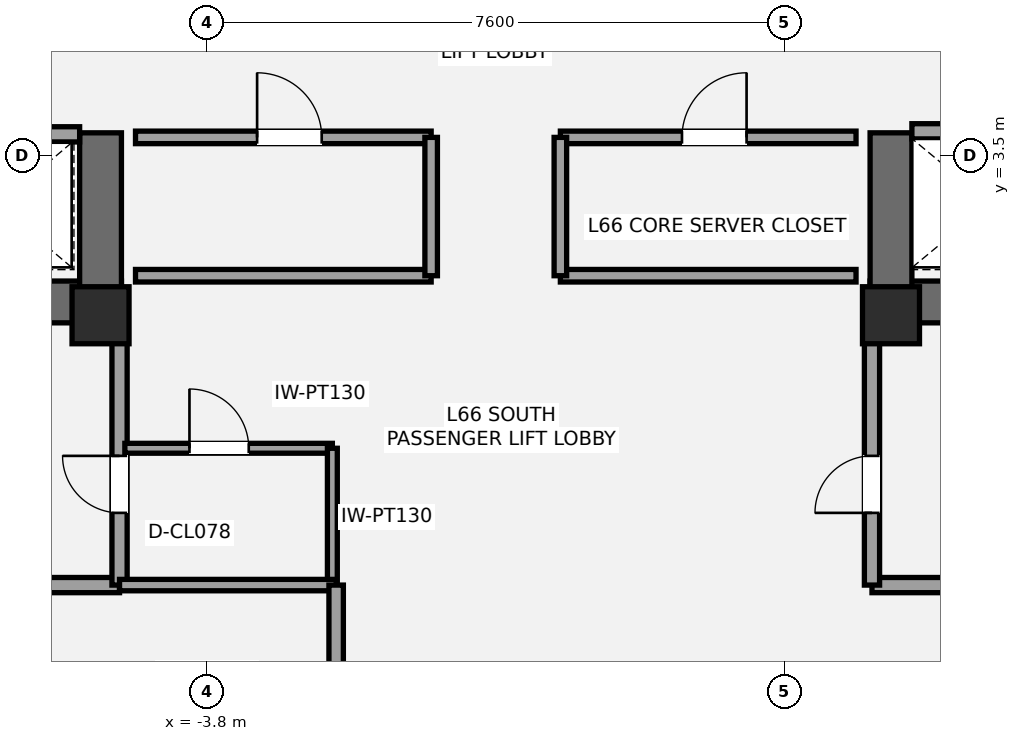
"""IFC4 building model, lengths in metres.
Left out: names, types, materials, properties, quantities, classifications, styles, units other than length and angle.
Written with IfcOpenShell. Run it as: python <this file> out.ifc"""

import sys

from ifc_helpers import new_model, si_unit, direction, frame, frame_2d, origin, origin_2d, place, context, subcontext, project, spatial, rectangle, extrude, element, fill, save


model = new_model("IFC4")
c1 = context("Model", 3, precision=1e-05, world=origin(), true_north=direction((0.0, 1.0)))
c2 = subcontext(c1, "Body", "Model", "MODEL_VIEW")
j1 = project(units=[si_unit("LENGTHUNIT", "METRE"), si_unit("PLANEANGLEUNIT", "RADIAN")], contexts=[c1])
p1 = place(None, origin())
s1 = spatial("IfcSite", under=j1, at=p1, CompositionType="ELEMENT")
p2 = place(p1, origin())
s2 = spatial("IfcBuilding", under=s1, at=p2, CompositionType="ELEMENT")
p3 = place(p2, frame((0.0, 0.0, 235.2)))
s3 = spatial("IfcBuildingStorey", under=s2, at=p3, CompositionType="ELEMENT", Elevation=235.2)
p4 = place(p3, frame((-4.925, 1.575, 0.0), z_axis=(0.0, 0.0, 1.0), x_axis=(-1.0, 0.0, 0.0)))
e1 = element("IfcWall", 1, at=p4, inside=s3, PredefinedType="SHEAR", context=c2, shape_type="SweptSolid", body=[
    extrude(rectangle(XDim=8.775, YDim=0.55, at=frame_2d((4.387, 0.0))), origin(), (0.0, 0.0, 1.0), 3.15),
])
p5 = place(p4, frame((5.375, 0.0, 0.0)))
e2 = element("IfcOpeningElement", 2, at=p5, cuts=e1, PredefinedType="OPENING", context=c2, shape_type="SweptSolid", body=[
    extrude(rectangle(XDim=1.05, YDim=2.15, at=frame_2d((0.525, 1.075))), frame((0.0, 0.285, 0.0), z_axis=(0.0, -1.0, 0.0), x_axis=(1.0, 0.0, 0.0)), (0.0, 0.0, 1.0), 0.57),
])
p6 = place(p4, frame((3.705, 0.0, 0.0)))
e3 = element("IfcOpeningElement", 3, at=p6, cuts=e1, PredefinedType="OPENING", context=c2, shape_type="SweptSolid", body=[
    extrude(rectangle(XDim=1.1, YDim=2.2, at=frame_2d((0.55, 1.1))), frame((0.0, 0.285, 0.0), z_axis=(0.0, -1.0, 0.0), x_axis=(1.0, 0.0, 0.0)), (0.0, 0.0, 1.0), 0.57),
])
p7 = place(p3, frame((-5.2, 1.3, 0.0), z_axis=(0.0, 0.0, 1.0), x_axis=(0.0, 1.0, 0.0)))
e4 = element("IfcWall", 4, at=p7, inside=s3, PredefinedType="SHEAR", context=c2, shape_type="SweptSolid", body=[
    extrude(rectangle(XDim=2.5, YDim=0.55, at=frame_2d((1.25, 0.0))), origin(), (0.0, 0.0, 1.0), 3.15),
])
p8 = place(p3, frame((13.7, 1.575, 0.0), z_axis=(0.0, 0.0, 1.0), x_axis=(-1.0, 0.0, 0.0)))
e5 = element("IfcWall", 5, at=p8, inside=s3, PredefinedType="SHEAR", context=c2, shape_type="SweptSolid", body=[
    extrude(rectangle(XDim=8.775, YDim=0.55, at=frame_2d((4.387, 0.0))), origin(), (0.0, 0.0, 1.0), 3.15),
])
p9 = place(p8, frame((2.35, 0.0, 0.0)))
e6 = element("IfcOpeningElement", 6, at=p9, cuts=e5, PredefinedType="OPENING", context=c2, shape_type="SweptSolid", body=[
    extrude(rectangle(XDim=1.05, YDim=2.15, at=frame_2d((0.525, 1.075))), frame((0.0, 0.285, 0.0), z_axis=(0.0, -1.0, 0.0), x_axis=(1.0, 0.0, 0.0)), (0.0, 0.0, 1.0), 0.57),
])
p10 = place(p8, frame((4.35, 0.0, 0.0)))
e7 = element("IfcOpeningElement", 7, at=p10, cuts=e5, PredefinedType="OPENING", context=c2, shape_type="SweptSolid", body=[
    extrude(rectangle(XDim=1.1, YDim=2.2, at=frame_2d((0.55, 1.1))), frame((0.0, 0.285, 0.0), z_axis=(0.0, -1.0, 0.0), x_axis=(1.0, 0.0, 0.0)), (0.0, 0.0, 1.0), 0.57),
])
p11 = place(p3, frame((5.2, 1.3, 0.0), z_axis=(0.0, 0.0, 1.0), x_axis=(0.0, 1.0, 0.0)))
e8 = element("IfcWall", 8, at=p11, inside=s3, PredefinedType="SHEAR", context=c2, shape_type="SweptSolid", body=[
    extrude(rectangle(XDim=2.5, YDim=0.55, at=frame_2d((1.25, 0.0))), origin(), (0.0, 0.0, 1.0), 3.15),
])
for number, where, z_axis, x_axis in (
    (9, (-5.2, 1.4, 0.0), (0.0, 0.0, 1.0), (1.0, 0.0, 0.0)),
    (10, (5.2, 1.4, 0.0), (0.0, 0.0, 1.0), (1.0, 0.0, 0.0)),
):
    element("IfcColumn", number, at=place(p3, frame(where, z_axis=z_axis, x_axis=x_axis)), inside=s3, PredefinedType="PILASTER", context=c2, shape_type="SweptSolid", body=[
        extrude(rectangle(XDim=0.75, YDim=0.75, at=origin_2d()), origin(), (0.0, 0.0, 1.0), 3.15),
    ])
p12 = place(p3, frame((-7.2, -2.15, 0.0), z_axis=(0.0, 0.0, 1.0), x_axis=(1.0, 0.0, 0.0)))
e11 = element("IfcWall", 11, at=p12, inside=s3, PredefinedType="SOLIDWALL", context=c2, shape_type="SweptSolid", body=[
    extrude(rectangle(XDim=2.25, YDim=0.2, at=frame_2d((1.125, 0.0))), origin(), (0.0, 0.0, 1.0), 2.97),
])
p13 = place(p3, frame((-4.95, -2.15, 0.0), z_axis=(0.0, 0.0, 1.0), x_axis=(0.0, 1.0, 0.0)))
e12 = element("IfcWall", 12, at=p13, inside=s3, PredefinedType="SOLIDWALL", context=c2, shape_type="SweptSolid", body=[
    extrude(rectangle(XDim=3.5, YDim=0.2, at=frame_2d((1.75, 0.0))), origin(), (0.0, 0.0, 1.0), 2.423),
])
p14 = place(p13, frame((0.95, 0.0, 0.0)))
e13 = element("IfcOpeningElement", 13, at=p14, cuts=e12, PredefinedType="OPENING", context=c2, shape_type="SweptSolid", body=[
    extrude(rectangle(XDim=0.75, YDim=2.1, at=frame_2d((0.375, 1.05))), frame((0.0, 0.11, 0.0), z_axis=(0.0, -1.0, 0.0), x_axis=(1.0, 0.0, 0.0)), (0.0, 0.0, 1.0), 0.22),
])
p15 = place(p3, frame((4.95, -2.15, 0.0), z_axis=(0.0, 0.0, 1.0), x_axis=(1.0, 0.0, 0.0)))
e14 = element("IfcWall", 14, at=p15, inside=s3, PredefinedType="SOLIDWALL", context=c2, shape_type="SweptSolid", body=[
    extrude(rectangle(XDim=2.25, YDim=0.2, at=frame_2d((1.125, 0.0))), origin(), (0.0, 0.0, 1.0), 2.97),
])
p16 = place(p3, frame((4.95, -2.15, 0.0), z_axis=(0.0, 0.0, 1.0), x_axis=(0.0, 1.0, 0.0)))
e15 = element("IfcWall", 15, at=p16, inside=s3, PredefinedType="SOLIDWALL", context=c2, shape_type="SweptSolid", body=[
    extrude(rectangle(XDim=3.5, YDim=0.2, at=frame_2d((1.75, 0.0))), origin(), (0.0, 0.0, 1.0), 2.423),
])
p17 = place(p16, frame((0.95, 0.0, 0.0)))
e16 = element("IfcOpeningElement", 16, at=p17, cuts=e15, PredefinedType="OPENING", context=c2, shape_type="SweptSolid", body=[
    extrude(rectangle(XDim=0.75, YDim=2.1, at=frame_2d((0.375, 1.05))), frame((0.0, 0.11, 0.0), z_axis=(0.0, -1.0, 0.0), x_axis=(1.0, 0.0, 0.0)), (0.0, 0.0, 1.0), 0.22),
])
p18 = place(p3, frame((-4.88, -0.35, 0.0), z_axis=(0.0, 0.0, 1.0), x_axis=(1.0, 0.0, 0.0)))
e17 = element("IfcWall", 17, at=p18, inside=s3, PredefinedType="PARTITIONING", context=c2, shape_type="SweptSolid", body=[
    extrude(rectangle(XDim=2.73, YDim=0.13, at=frame_2d((1.365, 0.0))), origin(), (0.0, 0.0, 1.0), 2.97),
])
p19 = place(p18, frame((0.85, 0.0, 0.0)))
e18 = element("IfcOpeningElement", 18, at=p19, cuts=e17, PredefinedType="OPENING", context=c2, shape_type="SweptSolid", body=[
    extrude(rectangle(XDim=0.78, YDim=2.1, at=frame_2d((0.39, 1.05))), frame((0.0, 0.075, 0.0), z_axis=(0.0, -1.0, 0.0), x_axis=(1.0, 0.0, 0.0)), (0.0, 0.0, 1.0), 0.15),
])
p20 = place(p3, frame((-2.15, -2.15, 0.0), z_axis=(0.0, 0.0, 1.0), x_axis=(0.0, 1.0, 0.0)))
e19 = element("IfcWall", 19, at=p20, inside=s3, PredefinedType="PARTITIONING", context=c2, shape_type="SweptSolid", body=[
    extrude(rectangle(XDim=1.8, YDim=0.13, at=frame_2d((0.9, 0.0))), origin(), (0.0, 0.0, 1.0), 2.97),
])
p21 = place(p3, frame((-9.78, 3.78, 0.0), z_axis=(0.0, 0.0, 1.0), x_axis=(1.0, 0.0, 0.0)))
e20 = element("IfcWall", 20, at=p21, inside=s3, PredefinedType="SOLIDWALL", context=c2, shape_type="SweptSolid", body=[
    extrude(rectangle(XDim=4.305, YDim=0.2, at=frame_2d((2.152, 0.0))), origin(), (0.0, 0.0, 1.0), 2.97),
])
p22 = place(p21, frame((2.72, 0.0, 0.0)))
e21 = element("IfcOpeningElement", 21, at=p22, cuts=e20, PredefinedType="OPENING", context=c2, shape_type="SweptSolid", body=[
    extrude(rectangle(XDim=1.1, YDim=2.2, at=frame_2d((0.55, 1.1))), frame((0.0, 0.11, 0.0), z_axis=(0.0, -1.0, 0.0), x_axis=(1.0, 0.0, 0.0)), (0.0, 0.0, 1.0), 0.22),
])
p23 = place(p3, frame((5.475, 3.82, 0.0), z_axis=(0.0, 0.0, 1.0), x_axis=(1.0, 0.0, 0.0)))
e22 = element("IfcWall", 22, at=p23, inside=s3, PredefinedType="SOLIDWALL", context=c2, shape_type="SweptSolid", body=[
    extrude(rectangle(XDim=4.305, YDim=0.2, at=frame_2d((2.152, 0.0))), origin(), (0.0, 0.0, 1.0), 2.97),
])
p24 = place(p23, frame((0.65, 0.0, 0.0)))
e23 = element("IfcOpeningElement", 23, at=p24, cuts=e22, PredefinedType="OPENING", context=c2, shape_type="SweptSolid", body=[
    extrude(rectangle(XDim=1.2, YDim=2.2, at=frame_2d((0.6, 1.1))), frame((0.0, 0.11, 0.0), z_axis=(0.0, -1.0, 0.0), x_axis=(1.0, 0.0, 0.0)), (0.0, 0.0, 1.0), 0.22),
])
p25 = place(p3, frame((-4.74, 1.92, 0.0), z_axis=(0.0, 0.0, 1.0), x_axis=(1.0, 0.0, 0.0)))
e24 = element("IfcWall", 24, at=p25, inside=s3, PredefinedType="PARTITIONING", context=c2, shape_type="SweptSolid", body=[
    extrude(rectangle(XDim=3.89, YDim=0.165, at=frame_2d((1.945, 0.0))), origin(), (0.0, 0.0, 1.0), 2.11),
])
p26 = place(p3, frame((-4.74, 3.74, 0.0), z_axis=(0.0, 0.0, 1.0), x_axis=(1.0, 0.0, 0.0)))
e25 = element("IfcWall", 25, at=p26, inside=s3, PredefinedType="PARTITIONING", context=c2, shape_type="SweptSolid", body=[
    extrude(rectangle(XDim=3.89, YDim=0.165, at=frame_2d((1.945, 0.0))), origin(), (0.0, 0.0, 1.0), 2.97),
])
p27 = place(p26, frame((1.6, 0.0, 0.0)))
e26 = element("IfcOpeningElement", 26, at=p27, cuts=e25, PredefinedType="OPENING", context=c2, shape_type="SweptSolid", body=[
    extrude(rectangle(XDim=0.85, YDim=2.1, at=frame_2d((0.425, 1.05))), frame((0.0, 0.093, 0.0), z_axis=(0.0, -1.0, 0.0), x_axis=(1.0, 0.0, 0.0)), (0.0, 0.0, 1.0), 0.185),
])
p28 = place(p3, frame((-0.85, 1.92, 0.0), z_axis=(0.0, 0.0, 1.0), x_axis=(0.0, 1.0, 0.0)))
e27 = element("IfcWall", 27, at=p28, inside=s3, PredefinedType="PARTITIONING", context=c2, shape_type="SweptSolid", body=[
    extrude(rectangle(XDim=1.82, YDim=0.165, at=frame_2d((0.91, 0.0))), origin(), (0.0, 0.0, 1.0), 2.97),
])
p29 = place(p3, frame((0.85, 1.92, 0.0), z_axis=(0.0, 0.0, 1.0), x_axis=(1.0, 0.0, 0.0)))
e28 = element("IfcWall", 28, at=p29, inside=s3, PredefinedType="PARTITIONING", context=c2, shape_type="SweptSolid", body=[
    extrude(rectangle(XDim=3.89, YDim=0.165, at=frame_2d((1.945, 0.0))), origin(), (0.0, 0.0, 1.0), 2.11),
])
p30 = place(p3, frame((0.85, 3.74, 0.0), z_axis=(0.0, 0.0, 1.0), x_axis=(1.0, 0.0, 0.0)))
e29 = element("IfcWall", 29, at=p30, inside=s3, PredefinedType="PARTITIONING", context=c2, shape_type="SweptSolid", body=[
    extrude(rectangle(XDim=3.89, YDim=0.165, at=frame_2d((1.945, 0.0))), origin(), (0.0, 0.0, 1.0), 2.97),
])
p31 = place(p30, frame((1.6, 0.0, 0.0)))
e30 = element("IfcOpeningElement", 30, at=p31, cuts=e29, PredefinedType="OPENING", context=c2, shape_type="SweptSolid", body=[
    extrude(rectangle(XDim=0.85, YDim=2.1, at=frame_2d((0.425, 1.05))), frame((0.0, 0.093, 0.0), z_axis=(0.0, -1.0, 0.0), x_axis=(1.0, 0.0, 0.0)), (0.0, 0.0, 1.0), 0.185),
])
p32 = place(p3, frame((0.85, 1.92, 0.0), z_axis=(0.0, 0.0, 1.0), x_axis=(0.0, 1.0, 0.0)))
e31 = element("IfcWall", 31, at=p32, inside=s3, PredefinedType="PARTITIONING", context=c2, shape_type="SweptSolid", body=[
    extrude(rectangle(XDim=1.82, YDim=0.165, at=frame_2d((0.91, 0.0))), origin(), (0.0, 0.0, 1.0), 2.97),
])
p33 = place(p3, frame((-4.95, -2.15, 0.0), z_axis=(0.0, 0.0, 1.0), x_axis=(1.0, 0.0, 0.0)))
e32 = element("IfcWall", 32, at=p33, inside=s3, PredefinedType="PLUMBINGWALL", context=c2, shape_type="SweptSolid", body=[
    extrude(rectangle(XDim=2.85, YDim=0.15, at=frame_2d((1.425, 0.0))), origin(), (0.0, 0.0, 1.0), 2.97),
])
p34 = place(p3, frame((-2.1, -4.05, 0.0), z_axis=(0.0, 0.0, 1.0), x_axis=(0.0, 1.0, 0.0)))
e33 = element("IfcWall", 33, at=p34, inside=s3, PredefinedType="PLUMBINGWALL", context=c2, shape_type="SweptSolid", body=[
    extrude(rectangle(XDim=1.9, YDim=0.19, at=frame_2d((0.95, 0.0))), origin(), (0.0, 0.0, 1.0), 2.423),
])
p35 = place(p14, origin())
e34 = element("IfcDoor", 34, at=p35, inside=s3, OperationType="SINGLE_SWING_RIGHT", PredefinedType="DOOR", context=c2, shape_type="SweptSolid", body=[
    extrude(rectangle(XDim=0.75, YDim=2.1, at=frame_2d((0.375, 1.05))), frame((0.0, 0.025, 0.0), z_axis=(0.0, -1.0, 0.0), x_axis=(1.0, 0.0, 0.0)), (0.0, 0.0, 1.0), 0.05),
])
fill(e13, e34)
p36 = place(p17, origin())
e35 = element("IfcDoor", 35, at=p36, inside=s3, OperationType="SINGLE_SWING_LEFT", PredefinedType="DOOR", context=c2, shape_type="SweptSolid", body=[
    extrude(rectangle(XDim=0.75, YDim=2.1, at=frame_2d((0.375, 1.05))), frame((0.0, 0.025, 0.0), z_axis=(0.0, -1.0, 0.0), x_axis=(1.0, 0.0, 0.0)), (0.0, 0.0, 1.0), 0.05),
])
fill(e16, e35)
p37 = place(p19, origin())
e36 = element("IfcDoor", 36, at=p37, inside=s3, OperationType="SINGLE_SWING_LEFT", PredefinedType="DOOR", context=c2, shape_type="SweptSolid", body=[
    extrude(rectangle(XDim=0.78, YDim=2.1, at=frame_2d((0.39, 1.05))), frame((0.0, 0.025, 0.0), z_axis=(0.0, -1.0, 0.0), x_axis=(1.0, 0.0, 0.0)), (0.0, 0.0, 1.0), 0.05),
])
fill(e18, e36)
p38 = place(p27, origin())
e37 = element("IfcDoor", 37, at=p38, inside=s3, OperationType="SINGLE_SWING_LEFT", PredefinedType="DOOR", context=c2, shape_type="SweptSolid", body=[
    extrude(rectangle(XDim=0.85, YDim=2.1, at=frame_2d((0.425, 1.05))), frame((0.0, 0.025, 0.0), z_axis=(0.0, -1.0, 0.0), x_axis=(1.0, 0.0, 0.0)), (0.0, 0.0, 1.0), 0.05),
])
fill(e26, e37)
p39 = place(p31, origin())
e38 = element("IfcDoor", 38, at=p39, inside=s3, OperationType="SINGLE_SWING_RIGHT", PredefinedType="DOOR", context=c2, shape_type="SweptSolid", body=[
    extrude(rectangle(XDim=0.85, YDim=2.1, at=frame_2d((0.425, 1.05))), frame((0.0, 0.025, 0.0), z_axis=(0.0, -1.0, 0.0), x_axis=(1.0, 0.0, 0.0)), (0.0, 0.0, 1.0), 0.05),
])
fill(e30, e38)
save(model, sys.argv[1])
